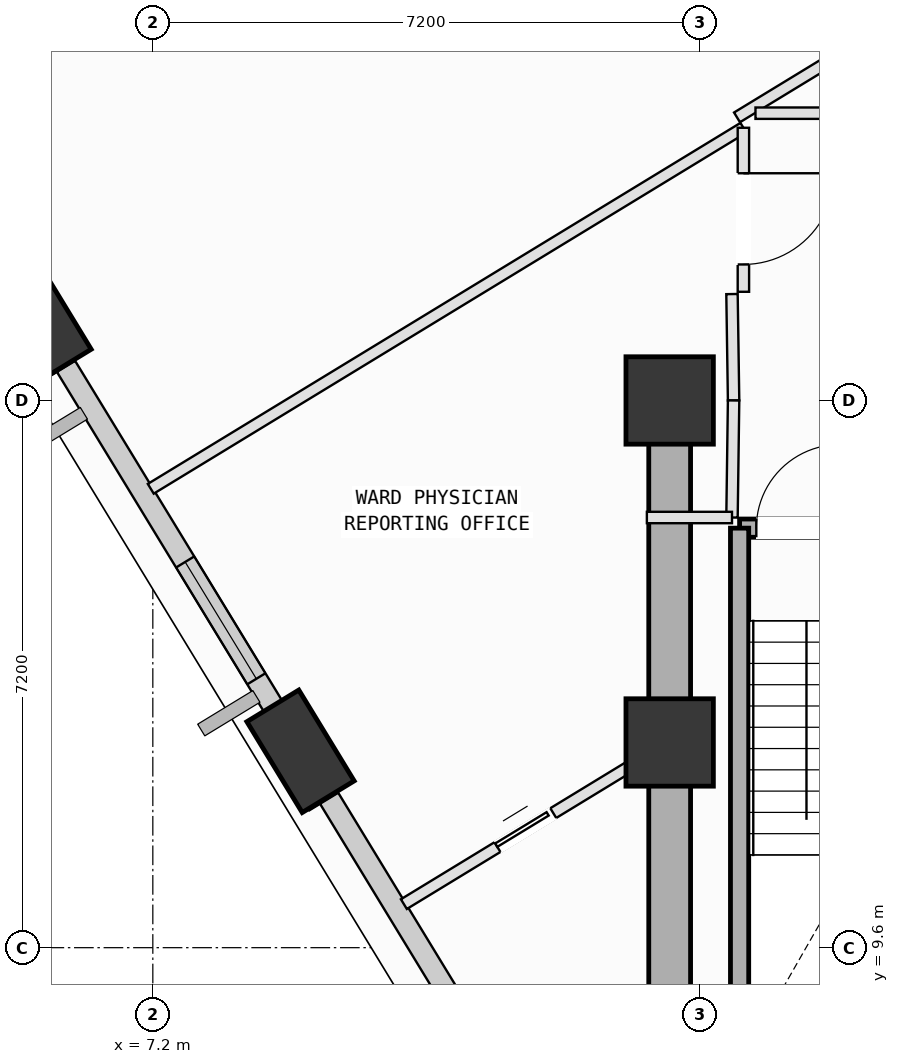
"""IFC4 building model, lengths in metres.
Left out: names, types, materials, properties, quantities, classifications, styles, units other than length and angle.
Written with IfcOpenShell. Run it as: python <this file> out.ifc"""

import sys

from ifc_helpers import new_model, si_unit, direction, frame, frame_2d, origin, origin_2d, place, context, subcontext, project, spatial, rectangle, extrude, element, fill, save


model = new_model("IFC4")
c1 = context("Model", 3, precision=1e-05, world=origin(), true_north=direction((0.0, 1.0)))
c2 = subcontext(c1, "Body", "Model", "MODEL_VIEW")
j1 = project(units=[si_unit("LENGTHUNIT", "METRE"), si_unit("PLANEANGLEUNIT", "RADIAN")], contexts=[c1])
p1 = place(None, origin())
s1 = spatial("IfcSite", under=j1, at=p1, CompositionType="ELEMENT")
p2 = place(p1, origin())
s2 = spatial("IfcBuilding", under=s1, at=p2, CompositionType="ELEMENT")
p3 = place(p2, frame((0.0, 0.0, 157.8)))
s3 = spatial("IfcBuildingStorey", under=s2, at=p3, CompositionType="ELEMENT", Elevation=157.8)
for number, where, z_axis, x_axis in (
    (1, (14.0, 12.3, 0.0), (0.0, 0.0, 1.0), (1.0, 0.0, 0.0)),
    (2, (14.0, 16.8, 0.0), (0.0, 0.0, 1.0), (1.0, 0.0, 0.0)),
):
    element("IfcColumn", number, at=place(p3, frame(where, z_axis=z_axis, x_axis=x_axis)), inside=s3, PredefinedType="COLUMN", context=c2, shape_type="SweptSolid", body=[
        extrude(rectangle(XDim=1.15, YDim=1.15, at=origin_2d()), origin(), (0.0, 0.0, 1.0), 4.0),
    ])
p4 = place(p3, frame((5.683, 17.863, 0.002), z_axis=(0.029481291731, -0.114710128938, 0.99296144928), x_axis=(-0.714969676256, 0.691800343152, 0.101146662078)))
e3 = element("IfcColumn", 3, at=p4, inside=s3, PredefinedType="COLUMN", context=c2, shape_type="SweptSolid", body=[
    extrude(rectangle(XDim=1.4, YDim=0.8, at=origin_2d()), origin(), (0.0, 0.0, 1.0), 4.025),
])
p5 = place(p3, frame((9.143, 12.184, 0.002), z_axis=(0.052806842128, -0.100272302524, 0.993557699769), x_axis=(-0.855705852019, 0.508331295313, 0.096782173078)))
e4 = element("IfcColumn", 4, at=p5, inside=s3, PredefinedType="COLUMN", context=c2, shape_type="SweptSolid", body=[
    extrude(rectangle(XDim=1.4, YDim=0.8, at=origin_2d()), origin(), (0.0, 0.0, 1.0), 4.022),
])
p6 = place(p3, frame((9.003, 12.413, 0.0), z_axis=(0.0, 0.0, 1.0), x_axis=(-0.520247840467, 0.85401533036, 0.0)))
e5 = element("IfcWall", 5, at=p6, inside=s3, PredefinedType="SOLIDWALL", context=c2, shape_type="SweptSolid", body=[
    extrude(rectangle(XDim=5.662, YDim=0.28, at=frame_2d((2.831, 0.0))), origin(), (0.0, 0.0, 1.0), 3.165),
])
p7 = place(p6, frame((0.848, 0.0, 0.75)))
e6 = element("IfcOpeningElement", 6, at=p7, cuts=e5, PredefinedType="OPENING", context=c2, shape_type="SweptSolid", body=[
    extrude(rectangle(XDim=1.8, YDim=2.05, at=frame_2d((0.9, 1.025))), frame((0.0, 0.15, 0.0), z_axis=(0.0, -1.0, 0.0), x_axis=(1.0, 0.0, 0.0)), (0.0, 0.0, 1.0), 0.3),
])
p8 = place(p3, frame((13.349, 5.28, 0.0), z_axis=(0.0, 0.0, 1.0), x_axis=(-0.520274172531, 0.853999288874, 0.0)))
e7 = element("IfcWall", 7, at=p8, inside=s3, PredefinedType="SOLIDWALL", context=c2, shape_type="SweptSolid", body=[
    extrude(rectangle(XDim=7.36, YDim=0.28, at=frame_2d((3.68, 0.0))), origin(), (0.0, 0.0, 1.0), 3.165),
])
p9 = place(p8, frame((2.125, 0.0, 0.75)))
e8 = element("IfcOpeningElement", 8, at=p9, cuts=e7, PredefinedType="OPENING", context=c2, shape_type="SweptSolid", body=[
    extrude(rectangle(XDim=1.2, YDim=1.75, at=frame_2d((0.6, 0.875))), frame((0.0, 0.15, 0.0), z_axis=(0.0, -1.0, 0.0), x_axis=(1.0, 0.0, 0.0)), (0.0, 0.0, 1.0), 0.3),
])
p10 = place(p3, frame((14.92, 15.12, 0.0), z_axis=(0.0, 0.0, 1.0), x_axis=(1.0, 0.0, 0.0)))
e9 = element("IfcWall", 9, at=p10, inside=s3, PredefinedType="SOLIDWALL", context=c2, shape_type="SweptSolid", body=[
    extrude(rectangle(XDim=3.46, YDim=0.24, at=frame_2d((1.73, 0.0))), origin(), (0.0, 0.0, 1.0), 3.78),
])
p11 = place(p10, frame((0.22, 0.0, 0.0)))
e10 = element("IfcOpeningElement", 10, at=p11, cuts=e9, PredefinedType="OPENING", context=c2, shape_type="SweptSolid", body=[
    extrude(rectangle(XDim=1.1, YDim=2.15, at=frame_2d((0.55, 1.075))), frame((0.0, 0.13, 0.0), z_axis=(0.0, -1.0, 0.0), x_axis=(1.0, 0.0, 0.0)), (0.0, 0.0, 1.0), 0.26),
])
p12 = place(p3, frame((14.92, 8.075, 0.0), z_axis=(0.0, 0.0, 1.0), x_axis=(0.0, 1.0, 0.0)))
e11 = element("IfcWall", 11, at=p12, inside=s3, PredefinedType="SOLIDWALL", context=c2, shape_type="SweptSolid", body=[
    extrude(rectangle(XDim=7.045, YDim=0.24, at=frame_2d((3.522, 0.0))), origin(), (0.0, 0.0, 1.0), 3.78),
])
p13 = place(p3, frame((14.0, 16.8, 0.0), z_axis=(0.0, 0.0, 1.0), x_axis=(0.0, -1.0, 0.0)))
e12 = element("IfcWall", 12, at=p13, inside=s3, PredefinedType="SHEAR", context=c2, shape_type="SweptSolid", body=[
    extrude(rectangle(XDim=9.0, YDim=0.55, at=frame_2d((4.5, 0.0))), origin(), (0.0, 0.0, 1.0), 3.78),
])
p14 = place(p3, frame((10.503, 10.173, 0.0), z_axis=(0.0, 0.0, 1.0), x_axis=(0.853962981961, 0.520333763502, 0.0)))
e13 = element("IfcWall", 13, at=p14, inside=s3, PredefinedType="PARTITIONING", context=c2, shape_type="SweptSolid", body=[
    extrude(rectangle(XDim=3.744, YDim=0.15, at=frame_2d((1.872, 0.0))), origin(), (0.0, 0.0, 1.0), 3.78),
])
p15 = place(p14, frame((1.442, 0.0, 0.0)))
e14 = element("IfcOpeningElement", 14, at=p15, cuts=e13, PredefinedType="OPENING", context=c2, shape_type="SweptSolid", body=[
    extrude(rectangle(XDim=0.86, YDim=2.06, at=frame_2d((0.43, 1.03))), frame((0.0, 0.085, 0.0), z_axis=(0.0, -1.0, 0.0), x_axis=(1.0, 0.0, 0.0)), (0.0, 0.0, 1.0), 0.17),
])
p16 = place(p3, frame((14.82, 18.2, 0.0), z_axis=(0.0, 0.0, 1.0), x_axis=(0.01499656939, -0.99988754513, 0.0)))
e15 = element("IfcWall", 15, at=p16, inside=s3, PredefinedType="PARTITIONING", context=c2, shape_type="SweptSolid", body=[
    extrude(rectangle(XDim=1.4, YDim=0.15, at=frame_2d((0.7, 0.0))), origin(), (0.0, 0.0, 1.0), 3.78),
])
p17 = place(p3, frame((14.841, 16.8, 0.0), z_axis=(0.0, 0.0, 1.0), x_axis=(-0.01363221443, -0.999907077048, 0.0)))
e16 = element("IfcWall", 16, at=p17, inside=s3, PredefinedType="PARTITIONING", context=c2, shape_type="SweptSolid", body=[
    extrude(rectangle(XDim=1.54, YDim=0.15, at=frame_2d((0.77, 0.0))), origin(), (0.0, 0.0, 1.0), 3.78),
])
p18 = place(p3, frame((14.82, 15.26, 0.0), z_axis=(0.0, 0.0, 1.0), x_axis=(-1.0, 0.0, 0.0)))
e17 = element("IfcWall", 17, at=p18, inside=s3, PredefinedType="PARTITIONING", context=c2, shape_type="SweptSolid", body=[
    extrude(rectangle(XDim=1.12, YDim=0.15, at=frame_2d((0.56, 0.0))), origin(), (0.0, 0.0, 1.0), 3.78),
])
p19 = place(p3, frame((9.323, 11.446, 0.0), z_axis=(0.0, 0.0, 1.0), x_axis=(-0.519946946896, 0.854198555614, 0.0)))
e18 = element("IfcWall", 18, at=p19, inside=s3, PredefinedType="PARTITIONING", context=c2, shape_type="SweptSolid", body=[
    extrude(rectangle(XDim=0.993, YDim=0.15, at=frame_2d((0.496, 0.0))), origin(), (0.0, 0.0, 1.0), 3.165),
])
p20 = place(p3, frame((7.173, 15.638, 0.0), z_axis=(0.0, 0.0, 1.0), x_axis=(0.854000204459, 0.52027266965, 0.0)))
e19 = element("IfcWall", 19, at=p20, inside=s3, PredefinedType="PARTITIONING", context=c2, shape_type="SweptSolid", body=[
    extrude(rectangle(XDim=9.13, YDim=0.15, at=frame_2d((4.565, 0.0))), origin(), (0.0, 0.0, 1.0), 3.78),
])
p21 = place(p3, frame((14.97, 20.388, 0.0), z_axis=(0.0, 0.0, 1.0), x_axis=(0.0, -1.0, 0.0)))
e20 = element("IfcWall", 20, at=p21, inside=s3, PredefinedType="PARTITIONING", context=c2, shape_type="SweptSolid", body=[
    extrude(rectangle(XDim=2.158, YDim=0.15, at=frame_2d((1.079, 0.0))), origin(), (0.0, 0.0, 1.0), 3.78),
])
p22 = place(p21, frame((0.598, 0.0, 0.0)))
e21 = element("IfcOpeningElement", 21, at=p22, cuts=e20, PredefinedType="OPENING", context=c2, shape_type="SweptSolid", body=[
    extrude(rectangle(XDim=1.2, YDim=2.15, at=frame_2d((0.6, 1.075))), frame((0.0, 0.085, 0.0), z_axis=(0.0, -1.0, 0.0), x_axis=(1.0, 0.0, 0.0)), (0.0, 0.0, 1.0), 0.17),
])
p23 = place(p3, frame((18.734, 22.869, 0.0), z_axis=(0.0, 0.0, 1.0), x_axis=(-0.854021673807, -0.520237427208, 0.0)))
e22 = element("IfcWall", 22, at=p23, inside=s3, PredefinedType="PARTITIONING", context=c2, shape_type="SweptSolid", body=[
    extrude(rectangle(XDim=4.506, YDim=0.15, at=frame_2d((2.253, 0.0))), origin(), (0.0, 0.0, 1.0), 3.78),
])
p24 = place(p3, frame((5.861, 17.129, 0.0), z_axis=(0.0, 0.0, 1.0), x_axis=(-0.520112490178, 0.854097768151, 0.0)))
e23 = element("IfcWall", 23, at=p24, inside=s3, PredefinedType="PARTITIONING", context=c2, shape_type="SweptSolid", body=[
    extrude(rectangle(XDim=0.982, YDim=0.15, at=frame_2d((0.491, 0.0))), origin(), (0.0, 0.0, 1.0), 3.165),
])
p25 = place(p3, frame((20.211, 20.58, 0.0), z_axis=(0.0, 0.0, 1.0), x_axis=(-1.0, 0.0, 0.0)))
e24 = element("IfcWall", 24, at=p25, inside=s3, PredefinedType="PARTITIONING", context=c2, shape_type="SweptSolid", body=[
    extrude(rectangle(XDim=5.082, YDim=0.15, at=frame_2d((2.541, 0.0))), origin(), (0.0, 0.0, 1.0), 3.78),
])
p26 = place(p25, frame((2.041, 0.0, 0.0)))
e25 = element("IfcOpeningElement", 25, at=p26, cuts=e24, PredefinedType="OPENING", context=c2, shape_type="SweptSolid", body=[
    extrude(rectangle(XDim=1.0, YDim=2.12, at=frame_2d((0.5, 1.06))), frame((0.0, 0.085, 0.0), z_axis=(0.0, -1.0, 0.0), x_axis=(1.0, 0.0, 0.0)), (0.0, 0.0, 1.0), 0.17),
])
p27 = place(p7, origin())
e26 = element("IfcWindow", 26, at=p27, inside=s3, PartitioningType="SINGLE_PANEL", PredefinedType="WINDOW", context=c2, shape_type="SweptSolid", body=[
    extrude(rectangle(XDim=1.8, YDim=2.05, at=frame_2d((0.9, 1.025))), frame((0.0, 0.03, 0.0), z_axis=(0.0, -1.0, 0.0), x_axis=(1.0, 0.0, 0.0)), (0.0, 0.0, 1.0), 0.06),
])
fill(e6, e26)
p28 = place(p11, origin())
e27 = element("IfcDoor", 27, at=p28, inside=s3, OperationType="SINGLE_SWING_RIGHT", PredefinedType="DOOR", context=c2, shape_type="SweptSolid", body=[
    extrude(rectangle(XDim=1.1, YDim=2.15, at=frame_2d((0.55, 1.075))), frame((0.0, 0.025, 0.0), z_axis=(0.0, -1.0, 0.0), x_axis=(1.0, 0.0, 0.0)), (0.0, 0.0, 1.0), 0.05),
])
fill(e10, e27)
p29 = place(p22, origin())
e28 = element("IfcDoor", 28, at=p29, inside=s3, OperationType="SINGLE_SWING_LEFT", PredefinedType="DOOR", context=c2, shape_type="SweptSolid", body=[
    extrude(rectangle(XDim=1.2, YDim=2.15, at=frame_2d((0.6, 1.075))), frame((0.0, 0.025, 0.0), z_axis=(0.0, -1.0, 0.0), x_axis=(1.0, 0.0, 0.0)), (0.0, 0.0, 1.0), 0.05),
])
fill(e21, e28)
p30 = place(p15, origin())
e29 = element("IfcDoor", 29, at=p30, inside=s3, OperationType="SLIDING_TO_LEFT", PredefinedType="DOOR", context=c2, shape_type="SweptSolid", body=[
    extrude(rectangle(XDim=0.86, YDim=2.06, at=frame_2d((0.43, 1.03))), frame((0.0, 0.025, 0.0), z_axis=(0.0, -1.0, 0.0), x_axis=(1.0, 0.0, 0.0)), (0.0, 0.0, 1.0), 0.05),
])
fill(e14, e29)
save(model, sys.argv[1])
